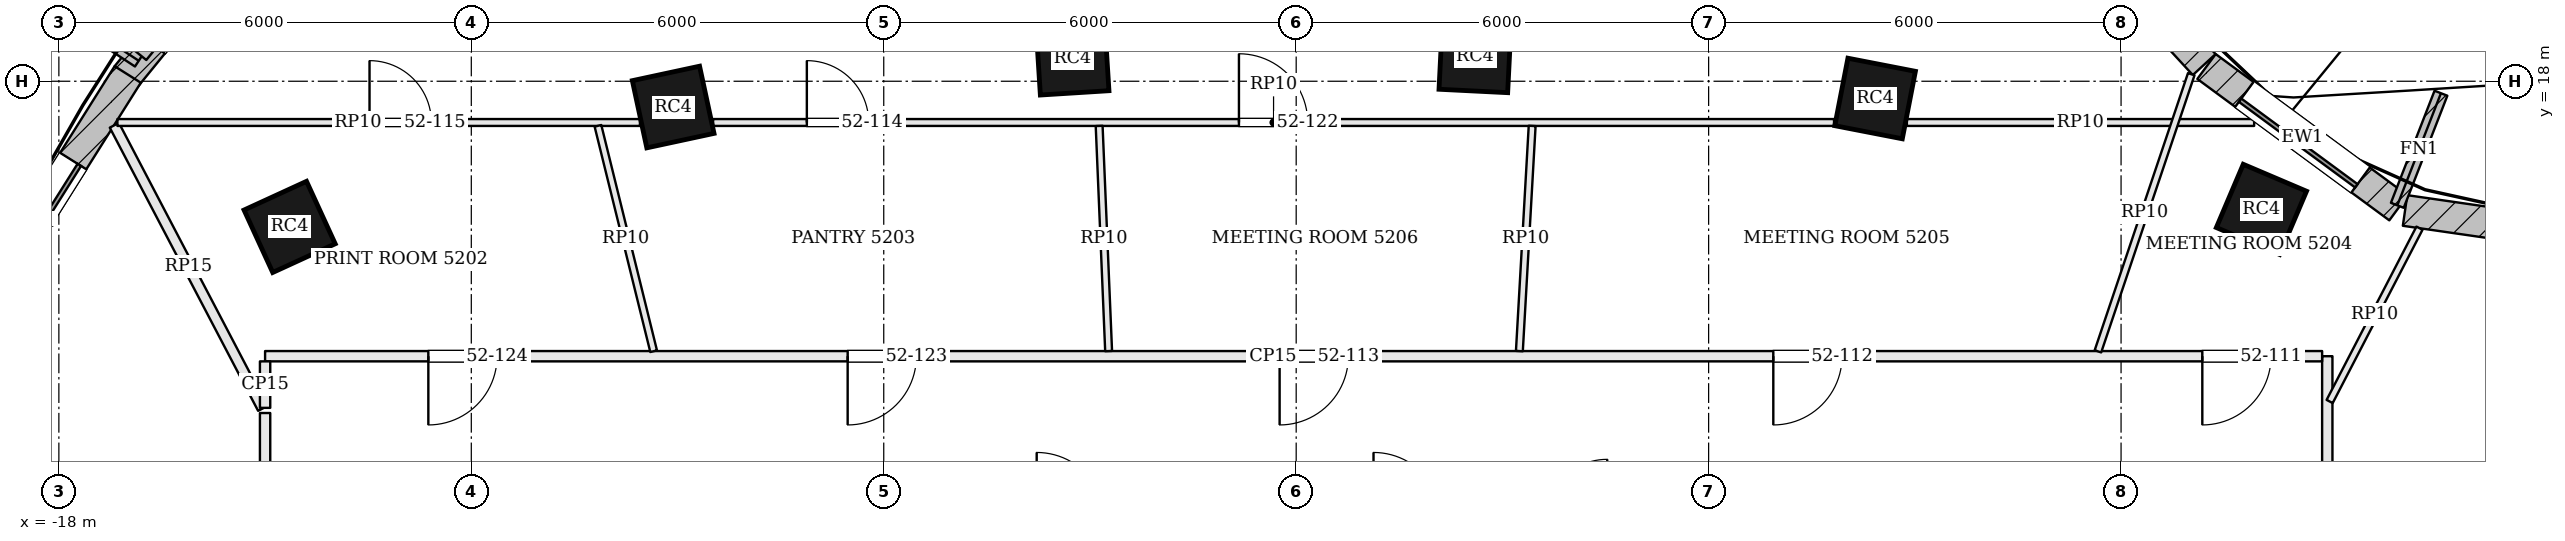
"""IFC4 building model, lengths in metres.
Left out: names, types, materials, properties, quantities, classifications, styles, units other than length and angle.
Written with IfcOpenShell. Run it as: python <this file> out.ifc"""

import sys

from ifc_helpers import new_model, si_unit, direction, frame, frame_2d, origin, origin_2d, place, context, subcontext, project, spatial, rectangle, extrude, element, fill, save


model = new_model("IFC4")
c1 = context("Model", 3, precision=1e-05, world=origin(), true_north=direction((0.0, 1.0)))
c2 = subcontext(c1, "Body", "Model", "MODEL_VIEW")
j1 = project(units=[si_unit("LENGTHUNIT", "METRE"), si_unit("PLANEANGLEUNIT", "RADIAN")], contexts=[c1])
p1 = place(None, origin())
s1 = spatial("IfcSite", under=j1, at=p1, CompositionType="ELEMENT")
p2 = place(p1, origin())
s2 = spatial("IfcBuilding", under=s1, at=p2, CompositionType="ELEMENT")
p3 = place(p2, frame((0.0, 0.0, 213.0)))
s3 = spatial("IfcBuildingStorey", under=s2, at=p3, CompositionType="ELEMENT", Elevation=213.0)
for number, where, z_axis, x_axis in (
    (1, (14.042, 16.136, 0.0), (0.0, 0.0, 1.0), (-0.92, 0.392, 0.0)),
    (2, (8.422, 17.749, 0.0), (0.0, 0.0, 1.0), (-0.982, 0.191, 0.0)),
    (3, (2.602, 18.358, 0.0), (0.0, 0.0, 1.0), (-0.999, 0.05, 0.0)),
    (4, (-3.254, 18.33, 0.0), (0.0, 0.0, 1.0), (-0.998, -0.063, 0.0)),
    (5, (-9.063, 17.625, 0.0), (0.0, 0.0, 1.0), (-0.978, -0.21, 0.0)),
    (6, (-14.643, 15.881, 0.0), (0.0, 0.0, 1.0), (-0.909, -0.417, 0.0)),
):
    element("IfcColumn", number, at=place(p3, frame(where, z_axis=z_axis, x_axis=x_axis)), inside=s3, PredefinedType="COLUMN", context=c2, shape_type="SweptSolid", body=[
        extrude(rectangle(XDim=1.0, YDim=1.0, at=origin_2d()), origin(), (0.0, 0.0, 1.0), 3.9),
    ])
p4 = place(p3, frame((21.825, 15.297, 0.0), z_axis=(0.0, 0.0, 1.0), x_axis=(-0.98971474215, 0.143054986527, 0.0)))
e7 = element("IfcWall", 7, at=p4, inside=s3, PredefinedType="SOLIDWALL", context=c2, shape_type="SweptSolid", body=[
    extrude(rectangle(XDim=5.753, YDim=0.45, at=frame_2d((2.876, 0.0))), origin(), (0.0, 0.0, 1.0), 3.6),
])
p5 = place(p4, frame((1.826, 0.0, 0.9)))
e8 = element("IfcOpeningElement", 8, at=p5, cuts=e7, PredefinedType="OPENING", context=c2, shape_type="SweptSolid", body=[
    extrude(rectangle(XDim=2.1, YDim=1.8, at=frame_2d((1.05, 0.9))), frame((0.0, 0.235, 0.0), z_axis=(0.0, -1.0, 0.0), x_axis=(1.0, 0.0, 0.0)), (0.0, 0.0, 1.0), 0.47),
])
p6 = place(p3, frame((16.036, 16.158, 0.0), z_axis=(0.0, 0.0, 1.0), x_axis=(-0.805181432967, 0.593028549064, 0.0)))
e9 = element("IfcWall", 9, at=p6, inside=s3, PredefinedType="SOLIDWALL", context=c2, shape_type="SweptSolid", body=[
    extrude(rectangle(XDim=3.469, YDim=0.45, at=frame_2d((1.734, 0.0))), origin(), (0.0, 0.0, 1.0), 3.6),
])
p7 = place(p6, frame((0.684, 0.0, 0.9)))
e10 = element("IfcOpeningElement", 10, at=p7, cuts=e9, PredefinedType="OPENING", context=c2, shape_type="SweptSolid", body=[
    extrude(rectangle(XDim=2.1, YDim=1.8, at=frame_2d((1.05, 0.9))), frame((0.0, 0.235, 0.0), z_axis=(0.0, -1.0, 0.0), x_axis=(1.0, 0.0, 0.0)), (0.0, 0.0, 1.0), 0.47),
])
p8 = place(p3, frame((13.209, 18.243, 0.0), z_axis=(0.0, 0.0, 1.0), x_axis=(-0.677612152497, 0.735419452278, 0.0)))
e11 = element("IfcWall", 11, at=p8, inside=s3, PredefinedType="SOLIDWALL", context=c2, shape_type="SweptSolid", body=[
    extrude(rectangle(XDim=3.797, YDim=0.45, at=frame_2d((1.898, 0.0))), origin(), (0.0, 0.0, 1.0), 3.6),
])
p9 = place(p8, frame((0.848, 0.0, 0.9)))
e12 = element("IfcOpeningElement", 12, at=p9, cuts=e11, PredefinedType="OPENING", context=c2, shape_type="SweptSolid", body=[
    extrude(rectangle(XDim=2.1, YDim=1.8, at=frame_2d((1.05, 0.9))), frame((0.0, 0.235, 0.0), z_axis=(0.0, -1.0, 0.0), x_axis=(1.0, 0.0, 0.0)), (0.0, 0.0, 1.0), 0.47),
])
p10 = place(p3, frame((-14.926, 20.641, 0.0), z_axis=(0.0, 0.0, 1.0), x_axis=(-0.631548074669, -0.775336720001, 0.0)))
e13 = element("IfcWall", 13, at=p10, inside=s3, PredefinedType="SOLIDWALL", context=c2, shape_type="SweptSolid", body=[
    extrude(rectangle(XDim=3.308, YDim=0.45, at=frame_2d((1.654, 0.0))), origin(), (0.0, 0.0, 1.0), 3.6),
])
p11 = place(p10, frame((0.604, 0.0, 0.9)))
e14 = element("IfcOpeningElement", 14, at=p11, cuts=e13, PredefinedType="OPENING", context=c2, shape_type="SweptSolid", body=[
    extrude(rectangle(XDim=2.1, YDim=1.8, at=frame_2d((1.05, 0.9))), frame((0.0, 0.235, 0.0), z_axis=(0.0, -1.0, 0.0), x_axis=(1.0, 0.0, 0.0)), (0.0, 0.0, 1.0), 0.47),
])
p12 = place(p3, frame((-16.998, 18.099, 0.0), z_axis=(0.0, 0.0, 1.0), x_axis=(-0.532745661304, -0.846275404559, 0.0)))
e15 = element("IfcWall", 15, at=p12, inside=s3, PredefinedType="SOLIDWALL", context=c2, shape_type="SweptSolid", body=[
    extrude(rectangle(XDim=5.076, YDim=0.45, at=frame_2d((2.538, 0.0))), origin(), (0.0, 0.0, 1.0), 3.6),
])
p13 = place(p12, frame((1.488, 0.0, 0.9)))
e16 = element("IfcOpeningElement", 16, at=p13, cuts=e15, PredefinedType="OPENING", context=c2, shape_type="SweptSolid", body=[
    extrude(rectangle(XDim=2.1, YDim=1.8, at=frame_2d((1.05, 0.9))), frame((0.0, 0.235, 0.0), z_axis=(0.0, -1.0, 0.0), x_axis=(1.0, 0.0, 0.0)), (0.0, 0.0, 1.0), 0.47),
])
p14 = place(p3, frame((16.019, 16.195, 0.0), z_axis=(0.0, 0.0, 1.0), x_axis=(0.362641522028, 0.931928713208, 0.0)))
e17 = element("IfcWall", 17, at=p14, inside=s3, PredefinedType="SOLIDWALL", context=c2, shape_type="SweptSolid", body=[
    extrude(rectangle(XDim=1.75, YDim=0.2, at=frame_2d((0.875, 0.0))), origin(), (0.0, 0.0, 1.0), 3.6),
])
p15 = place(p3, frame((-16.838, 18.298, 0.0), z_axis=(0.0, 0.0, 1.0), x_axis=(-0.835871900419, 0.548924554097, 0.0)))
e18 = element("IfcWall", 18, at=p15, inside=s3, PredefinedType="SOLIDWALL", context=c2, shape_type="SweptSolid", body=[
    extrude(rectangle(XDim=1.75, YDim=0.2, at=frame_2d((0.875, 0.0))), origin(), (0.0, 0.0, 1.0), 3.6),
])
p16 = place(p3, frame((-15.063, 20.591, 3.9), z_axis=(0.0, 0.0, 1.0), x_axis=(-0.631553484363, -0.77533231352, 0.0)))
e19 = element("IfcWall", 19, at=p16, inside=s3, PredefinedType="PARAPET", context=c2, shape_type="SweptSolid", body=[
    extrude(rectangle(XDim=2.82, YDim=0.3, at=frame_2d((1.41, 0.0))), origin(), (0.0, 0.0, 1.0), 1.1),
])
p17 = place(p3, frame((-15.0, 13.174, 0.0), z_axis=(0.0, 0.0, 1.0), x_axis=(0.0, -1.0, 0.0)))
e20 = element("IfcWall", 20, at=p17, inside=s3, PredefinedType="PARTITIONING", context=c2, shape_type="SweptSolid", body=[
    extrude(rectangle(XDim=3.052, YDim=0.15, at=frame_2d((1.526, 0.0))), origin(), (0.0, 0.0, 1.0), 2.984),
])
p18 = place(p3, frame((-17.193, 17.36, 0.0), z_axis=(0.0, 0.0, 1.0), x_axis=(0.463995225493, -0.885837699988, 0.0)))
e21 = element("IfcWall", 21, at=p18, inside=s3, PredefinedType="PARTITIONING", context=c2, shape_type="SweptSolid", body=[
    extrude(rectangle(XDim=4.651, YDim=0.15, at=frame_2d((2.325, 0.0))), origin(), (0.0, 0.0, 1.0), 3.084),
])
p19 = place(p3, frame((15.0, 10.196, 0.0), z_axis=(0.0, 0.0, 1.0), x_axis=(0.0, 1.0, 0.0)))
e22 = element("IfcWall", 22, at=p19, inside=s3, PredefinedType="PARTITIONING", context=c2, shape_type="SweptSolid", body=[
    extrude(rectangle(XDim=3.804, YDim=0.15, at=frame_2d((1.902, 0.0))), origin(), (0.0, 0.0, 1.0), 2.984),
])
p20 = place(p3, frame((14.925, 14.0, 0.0), z_axis=(0.0, 0.0, 1.0), x_axis=(-1.0, 0.0, 0.0)))
e23 = element("IfcWall", 23, at=p20, inside=s3, PredefinedType="PARTITIONING", context=c2, shape_type="SweptSolid", body=[
    extrude(rectangle(XDim=29.925, YDim=0.15, at=frame_2d((14.962, 0.0))), origin(), (0.0, 0.0, 1.0), 2.984),
])
p21 = place(p20, frame((0.743, 0.0, 0.0)))
e24 = element("IfcOpeningElement", 24, at=p21, cuts=e23, PredefinedType="OPENING", context=c2, shape_type="SweptSolid", body=[
    extrude(rectangle(XDim=1.0, YDim=2.4, at=frame_2d((0.5, 1.2))), frame((0.0, 0.085, 0.0), z_axis=(0.0, -1.0, 0.0), x_axis=(1.0, 0.0, 0.0)), (0.0, 0.0, 1.0), 0.17),
])
p22 = place(p20, frame((6.984, 0.0, 0.0)))
e25 = element("IfcOpeningElement", 25, at=p22, cuts=e23, PredefinedType="OPENING", context=c2, shape_type="SweptSolid", body=[
    extrude(rectangle(XDim=1.0, YDim=2.4, at=frame_2d((0.5, 1.2))), frame((0.0, 0.085, 0.0), z_axis=(0.0, -1.0, 0.0), x_axis=(1.0, 0.0, 0.0)), (0.0, 0.0, 1.0), 0.17),
])
p23 = place(p20, frame((14.166, 0.0, 0.0)))
e26 = element("IfcOpeningElement", 26, at=p23, cuts=e23, PredefinedType="OPENING", context=c2, shape_type="SweptSolid", body=[
    extrude(rectangle(XDim=1.0, YDim=2.4, at=frame_2d((0.5, 1.2))), frame((0.0, 0.085, 0.0), z_axis=(0.0, -1.0, 0.0), x_axis=(1.0, 0.0, 0.0)), (0.0, 0.0, 1.0), 0.17),
])
p24 = place(p20, frame((20.45, 0.0, 0.0)))
e27 = element("IfcOpeningElement", 27, at=p24, cuts=e23, PredefinedType="OPENING", context=c2, shape_type="SweptSolid", body=[
    extrude(rectangle(XDim=1.0, YDim=2.1, at=frame_2d((0.5, 1.05))), frame((0.0, 0.085, 0.0), z_axis=(0.0, -1.0, 0.0), x_axis=(1.0, 0.0, 0.0)), (0.0, 0.0, 1.0), 0.17),
])
p25 = place(p20, frame((26.55, 0.0, 0.0)))
e28 = element("IfcOpeningElement", 28, at=p25, cuts=e23, PredefinedType="OPENING", context=c2, shape_type="SweptSolid", body=[
    extrude(rectangle(XDim=1.0, YDim=2.1, at=frame_2d((0.5, 1.05))), frame((0.0, 0.085, 0.0), z_axis=(0.0, -1.0, 0.0), x_axis=(1.0, 0.0, 0.0)), (0.0, 0.0, 1.0), 0.17),
])
p26 = place(p3, frame((-15.0, 13.925, 0.0), z_axis=(0.0, 0.0, 1.0), x_axis=(0.0, -1.0, 0.0)))
e29 = element("IfcWall", 29, at=p26, inside=s3, PredefinedType="PARTITIONING", context=c2, shape_type="SweptSolid", body=[
    extrude(rectangle(XDim=0.677, YDim=0.15, at=frame_2d((0.338, 0.0))), origin(), (0.0, 0.0, 1.0), 2.984),
])
p27 = place(p3, frame((-17.149, 17.4, 0.0), z_axis=(0.0, 0.0, 1.0), x_axis=(1.0, 0.0, 0.0)))
e30 = element("IfcWall", 30, at=p27, inside=s3, PredefinedType="PARTITIONING", context=c2, shape_type="SweptSolid", body=[
    extrude(rectangle(XDim=7.602, YDim=0.1, at=frame_2d((3.801, 0.0))), origin(), (0.0, 0.0, 1.0), 2.984),
])
p28 = place(p27, frame((3.668, 0.0, 0.0)))
e31 = element("IfcOpeningElement", 31, at=p28, cuts=e30, PredefinedType="OPENING", context=c2, shape_type="SweptSolid", body=[
    extrude(rectangle(XDim=0.9, YDim=2.1, at=frame_2d((0.45, 1.05))), frame((0.0, 0.06, 0.0), z_axis=(0.0, -1.0, 0.0), x_axis=(1.0, 0.0, 0.0)), (0.0, 0.0, 1.0), 0.12),
])
p29 = place(p3, frame((-8.483, 17.4, 0.0), z_axis=(0.0, 0.0, 1.0), x_axis=(1.0, 0.0, 0.0)))
e32 = element("IfcWall", 32, at=p29, inside=s3, PredefinedType="PARTITIONING", context=c2, shape_type="SweptSolid", body=[
    extrude(rectangle(XDim=16.307, YDim=0.1, at=frame_2d((8.154, 0.0))), origin(), (0.0, 0.0, 1.0), 2.984),
])
p30 = place(p29, frame((1.364, 0.0, 0.0)))
e33 = element("IfcOpeningElement", 33, at=p30, cuts=e32, PredefinedType="OPENING", context=c2, shape_type="SweptSolid", body=[
    extrude(rectangle(XDim=0.9, YDim=2.1, at=frame_2d((0.45, 1.05))), frame((0.0, 0.06, 0.0), z_axis=(0.0, -1.0, 0.0), x_axis=(1.0, 0.0, 0.0)), (0.0, 0.0, 1.0), 0.12),
])
p31 = place(p29, frame((7.65, 0.0, 0.0)))
e34 = element("IfcOpeningElement", 34, at=p31, cuts=e32, PredefinedType="OPENING", context=c2, shape_type="SweptSolid", body=[
    extrude(rectangle(XDim=1.0, YDim=2.4, at=frame_2d((0.5, 1.2))), frame((0.0, 0.06, 0.0), z_axis=(0.0, -1.0, 0.0), x_axis=(1.0, 0.0, 0.0)), (0.0, 0.0, 1.0), 0.12),
])
p32 = place(p3, frame((8.884, 17.4, 0.0), z_axis=(0.0, 0.0, 1.0), x_axis=(1.0, 0.0, 0.0)))
e35 = element("IfcWall", 35, at=p32, inside=s3, PredefinedType="PARTITIONING", context=c2, shape_type="SweptSolid", body=[
    extrude(rectangle(XDim=5.052, YDim=0.1, at=frame_2d((2.526, 0.0))), origin(), (0.0, 0.0, 1.0), 2.984),
])
p33 = place(p3, frame((15.034, 13.341, 0.0), z_axis=(0.0, 0.0, 1.0), x_axis=(0.460131451108, 0.887850802614, 0.0)))
e36 = element("IfcWall", 36, at=p33, inside=s3, PredefinedType="PARTITIONING", context=c2, shape_type="SweptSolid", body=[
    extrude(rectangle(XDim=2.84, YDim=0.1, at=frame_2d((1.42, 0.0))), origin(), (0.0, 0.0, 1.0), 2.984),
])
p34 = place(p3, frame((11.664, 14.071, 0.0), z_axis=(0.0, 0.0, 1.0), x_axis=(0.319050122348, 0.947737843198, 0.0)))
e37 = element("IfcWall", 37, at=p34, inside=s3, PredefinedType="PARTITIONING", context=c2, shape_type="SweptSolid", body=[
    extrude(rectangle(XDim=4.254, YDim=0.1, at=frame_2d((2.127, 0.0))), origin(), (0.0, 0.0, 1.0), 2.984),
])
p35 = place(p3, frame((3.247, 14.075, 0.0), z_axis=(0.0, 0.0, 1.0), x_axis=(0.056636488477, 0.998394865859, 0.0)))
e38 = element("IfcWall", 38, at=p35, inside=s3, PredefinedType="PARTITIONING", context=c2, shape_type="SweptSolid", body=[
    extrude(rectangle(XDim=3.281, YDim=0.1, at=frame_2d((1.64, 0.0))), origin(), (0.0, 0.0, 1.0), 2.984),
])
p36 = place(p3, frame((-2.729, 14.075, 0.0), z_axis=(0.0, 0.0, 1.0), x_axis=(-0.042005382394, 0.99911738442, 0.0)))
e39 = element("IfcWall", 39, at=p36, inside=s3, PredefinedType="PARTITIONING", context=c2, shape_type="SweptSolid", body=[
    extrude(rectangle(XDim=3.278, YDim=0.1, at=frame_2d((1.639, 0.0))), origin(), (0.0, 0.0, 1.0), 2.984),
])
p37 = place(p3, frame((-9.347, 14.073, 0.0), z_axis=(0.0, 0.0, 1.0), x_axis=(-0.239847329474, 0.970810619299, 0.0)))
e40 = element("IfcWall", 40, at=p37, inside=s3, PredefinedType="PARTITIONING", context=c2, shape_type="SweptSolid", body=[
    extrude(rectangle(XDim=3.377, YDim=0.1, at=frame_2d((1.689, 0.0))), origin(), (0.0, 0.0, 1.0), 2.984),
])
p38 = place(p7, origin())
e41 = element("IfcWindow", 41, at=p38, inside=s3, PartitioningType="SINGLE_PANEL", PredefinedType="WINDOW", context=c2, shape_type="SweptSolid", body=[
    extrude(rectangle(XDim=2.1, YDim=1.8, at=frame_2d((1.05, 0.9))), frame((0.0, 0.135, 0.0), z_axis=(0.0, -1.0, 0.0), x_axis=(1.0, 0.0, 0.0)), (0.0, 0.0, 1.0), 0.06),
])
fill(e10, e41)
p39 = place(p13, origin())
e42 = element("IfcWindow", 42, at=p39, inside=s3, PartitioningType="SINGLE_PANEL", PredefinedType="WINDOW", context=c2, shape_type="SweptSolid", body=[
    extrude(rectangle(XDim=2.1, YDim=1.8, at=frame_2d((1.05, 0.9))), frame((0.0, 0.135, 0.0), z_axis=(0.0, -1.0, 0.0), x_axis=(1.0, 0.0, 0.0)), (0.0, 0.0, 1.0), 0.06),
])
fill(e16, e42)
p40 = place(p21, origin())
e43 = element("IfcDoor", 43, at=p40, inside=s3, OperationType="SINGLE_SWING_RIGHT", PredefinedType="DOOR", context=c2, shape_type="SweptSolid", body=[
    extrude(rectangle(XDim=1.0, YDim=2.4, at=frame_2d((0.5, 1.2))), frame((0.0, 0.025, 0.0), z_axis=(0.0, -1.0, 0.0), x_axis=(1.0, 0.0, 0.0)), (0.0, 0.0, 1.0), 0.05),
])
fill(e24, e43)
p41 = place(p22, origin())
e44 = element("IfcDoor", 44, at=p41, inside=s3, OperationType="SINGLE_SWING_RIGHT", PredefinedType="DOOR", context=c2, shape_type="SweptSolid", body=[
    extrude(rectangle(XDim=1.0, YDim=2.4, at=frame_2d((0.5, 1.2))), frame((0.0, 0.025, 0.0), z_axis=(0.0, -1.0, 0.0), x_axis=(1.0, 0.0, 0.0)), (0.0, 0.0, 1.0), 0.05),
])
fill(e25, e44)
p42 = place(p23, origin())
e45 = element("IfcDoor", 45, at=p42, inside=s3, OperationType="SINGLE_SWING_RIGHT", PredefinedType="DOOR", context=c2, shape_type="SweptSolid", body=[
    extrude(rectangle(XDim=1.0, YDim=2.4, at=frame_2d((0.5, 1.2))), frame((0.0, 0.025, 0.0), z_axis=(0.0, -1.0, 0.0), x_axis=(1.0, 0.0, 0.0)), (0.0, 0.0, 1.0), 0.05),
])
fill(e26, e45)
p43 = place(p30, origin())
e46 = element("IfcDoor", 46, at=p43, inside=s3, OperationType="SINGLE_SWING_LEFT", PredefinedType="DOOR", context=c2, shape_type="SweptSolid", body=[
    extrude(rectangle(XDim=0.9, YDim=2.1, at=frame_2d((0.45, 1.05))), frame((0.0, 0.025, 0.0), z_axis=(0.0, -1.0, 0.0), x_axis=(1.0, 0.0, 0.0)), (0.0, 0.0, 1.0), 0.05),
])
fill(e33, e46)
p44 = place(p28, origin())
e47 = element("IfcDoor", 47, at=p44, inside=s3, OperationType="SINGLE_SWING_LEFT", PredefinedType="DOOR", context=c2, shape_type="SweptSolid", body=[
    extrude(rectangle(XDim=0.9, YDim=2.1, at=frame_2d((0.45, 1.05))), frame((0.0, 0.025, 0.0), z_axis=(0.0, -1.0, 0.0), x_axis=(1.0, 0.0, 0.0)), (0.0, 0.0, 1.0), 0.05),
])
fill(e31, e47)
p45 = place(p31, origin())
e48 = element("IfcDoor", 48, at=p45, inside=s3, OperationType="SINGLE_SWING_LEFT", PredefinedType="DOOR", context=c2, shape_type="SweptSolid", body=[
    extrude(rectangle(XDim=1.0, YDim=2.4, at=frame_2d((0.5, 1.2))), frame((0.0, 0.025, 0.0), z_axis=(0.0, -1.0, 0.0), x_axis=(1.0, 0.0, 0.0)), (0.0, 0.0, 1.0), 0.05),
])
fill(e34, e48)
p46 = place(p24, origin())
e49 = element("IfcDoor", 49, at=p46, inside=s3, OperationType="SINGLE_SWING_RIGHT", PredefinedType="DOOR", context=c2, shape_type="SweptSolid", body=[
    extrude(rectangle(XDim=1.0, YDim=2.1, at=frame_2d((0.5, 1.05))), frame((0.0, 0.025, 0.0), z_axis=(0.0, -1.0, 0.0), x_axis=(1.0, 0.0, 0.0)), (0.0, 0.0, 1.0), 0.05),
])
fill(e27, e49)
p47 = place(p25, origin())
e50 = element("IfcDoor", 50, at=p47, inside=s3, OperationType="SINGLE_SWING_RIGHT", PredefinedType="DOOR", context=c2, shape_type="SweptSolid", body=[
    extrude(rectangle(XDim=1.0, YDim=2.1, at=frame_2d((0.5, 1.05))), frame((0.0, 0.025, 0.0), z_axis=(0.0, -1.0, 0.0), x_axis=(1.0, 0.0, 0.0)), (0.0, 0.0, 1.0), 0.05),
])
fill(e28, e50)
save(model, sys.argv[1])
